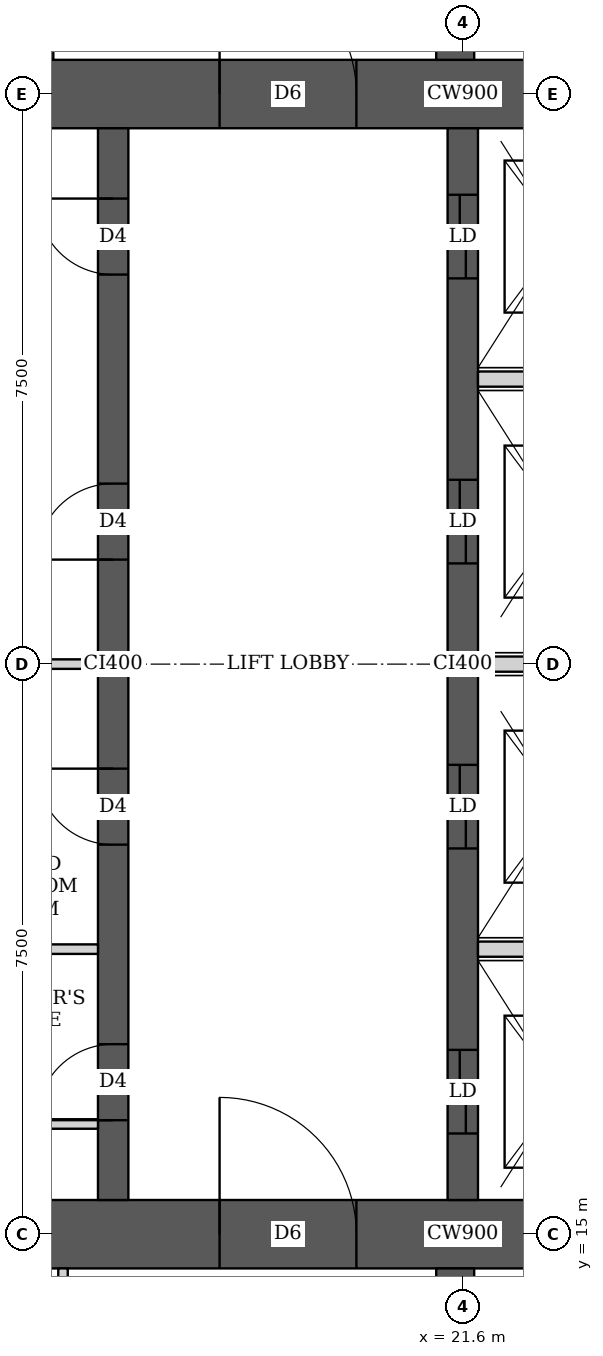
"""IFC4 building model, lengths in metres.
Left out: names, types, materials, properties, quantities, classifications, styles, units other than length and angle.
Written with IfcOpenShell. Run it as: python <this file> out.ifc"""

import sys

from ifc_helpers import new_model, si_unit, direction, frame, frame_2d, origin, place, context, subcontext, project, spatial, rectangle, extrude, element, fill, save


model = new_model("IFC4")
c1 = context("Model", 3, precision=1e-05, world=origin(), true_north=direction((0.0, 1.0)))
c2 = subcontext(c1, "Body", "Model", "MODEL_VIEW")
j1 = project(units=[si_unit("LENGTHUNIT", "METRE"), si_unit("PLANEANGLEUNIT", "RADIAN")], contexts=[c1])
p1 = place(None, origin())
s1 = spatial("IfcSite", under=j1, at=p1, CompositionType="ELEMENT")
p2 = place(p1, origin())
s2 = spatial("IfcBuilding", under=s1, at=p2, CompositionType="ELEMENT")
p3 = place(p2, frame((0.0, 0.0, 255.35)))
s3 = spatial("IfcBuildingStorey", under=s2, at=p3, CompositionType="ELEMENT", Elevation=255.35)
p4 = place(p3, frame((13.95, 15.0, 0.0), z_axis=(0.0, 0.0, 1.0), x_axis=(1.0, 0.0, 0.0)))
e1 = element("IfcWall", 1, at=p4, inside=s3, PredefinedType="SHEAR", context=c2, shape_type="SweptSolid", body=[
    extrude(rectangle(XDim=15.3, YDim=0.9, at=frame_2d((7.65, 0.0))), origin(), (0.0, 0.0, 1.0), 3.75),
])
p5 = place(p4, frame((4.45, 0.0, 0.0)))
e2 = element("IfcOpeningElement", 2, at=p5, cuts=e1, PredefinedType="OPENING", context=c2, shape_type="SweptSolid", body=[
    extrude(rectangle(XDim=1.8, YDim=2.1, at=frame_2d((0.9, 1.05))), frame((0.0, 0.46, 0.0), z_axis=(0.0, -1.0, 0.0), x_axis=(1.0, 0.0, 0.0)), (0.0, 0.0, 1.0), 0.92),
])
p6 = place(p4, frame((10.7, 0.0, 0.0)))
e3 = element("IfcOpeningElement", 3, at=p6, cuts=e1, PredefinedType="OPENING", context=c2, shape_type="SweptSolid", body=[
    extrude(rectangle(XDim=1.1, YDim=2.1, at=frame_2d((0.55, 1.05))), frame((0.0, 0.46, 0.0), z_axis=(0.0, -1.0, 0.0), x_axis=(1.0, 0.0, 0.0)), (0.0, 0.0, 1.0), 0.92),
])
p7 = place(p3, frame((13.95, 30.0, 0.0), z_axis=(0.0, 0.0, 1.0), x_axis=(1.0, 0.0, 0.0)))
e4 = element("IfcWall", 4, at=p7, inside=s3, PredefinedType="SHEAR", context=c2, shape_type="SweptSolid", body=[
    extrude(rectangle(XDim=15.3, YDim=0.9, at=frame_2d((7.65, 0.0))), origin(), (0.0, 0.0, 1.0), 3.75),
])
p8 = place(p7, frame((4.45, 0.0, 0.0)))
e5 = element("IfcOpeningElement", 5, at=p8, cuts=e4, PredefinedType="OPENING", context=c2, shape_type="SweptSolid", body=[
    extrude(rectangle(XDim=1.8, YDim=2.1, at=frame_2d((0.9, 1.05))), frame((0.0, 0.46, 0.0), z_axis=(0.0, -1.0, 0.0), x_axis=(1.0, 0.0, 0.0)), (0.0, 0.0, 1.0), 0.92),
])
p9 = place(p7, frame((10.7, 0.0, 0.0)))
e6 = element("IfcOpeningElement", 6, at=p9, cuts=e4, PredefinedType="OPENING", context=c2, shape_type="SweptSolid", body=[
    extrude(rectangle(XDim=1.1, YDim=2.1, at=frame_2d((0.55, 1.05))), frame((0.0, 0.46, 0.0), z_axis=(0.0, -1.0, 0.0), x_axis=(1.0, 0.0, 0.0)), (0.0, 0.0, 1.0), 0.92),
])
p10 = place(p3, frame((17.0, 15.45, 0.0), z_axis=(0.0, 0.0, 1.0), x_axis=(0.0, 1.0, 0.0)))
e7 = element("IfcWall", 7, at=p10, inside=s3, PredefinedType="SHEAR", context=c2, shape_type="SweptSolid", body=[
    extrude(rectangle(XDim=14.1, YDim=0.4, at=frame_2d((7.05, 0.0))), origin(), (0.0, 0.0, 1.0), 3.75),
])
p11 = place(p10, frame((1.05, 0.0, 0.0)))
e8 = element("IfcOpeningElement", 8, at=p11, cuts=e7, PredefinedType="OPENING", context=c2, shape_type="SweptSolid", body=[
    extrude(rectangle(XDim=1.0, YDim=2.1, at=frame_2d((0.5, 1.05))), frame((0.0, 0.21, 0.0), z_axis=(0.0, -1.0, 0.0), x_axis=(1.0, 0.0, 0.0)), (0.0, 0.0, 1.0), 0.42),
])
p12 = place(p10, frame((4.675, 0.0, 0.0)))
e9 = element("IfcOpeningElement", 9, at=p12, cuts=e7, PredefinedType="OPENING", context=c2, shape_type="SweptSolid", body=[
    extrude(rectangle(XDim=1.0, YDim=2.1, at=frame_2d((0.5, 1.05))), frame((0.0, 0.21, 0.0), z_axis=(0.0, -1.0, 0.0), x_axis=(1.0, 0.0, 0.0)), (0.0, 0.0, 1.0), 0.42),
])
p13 = place(p10, frame((8.425, 0.0, 0.0)))
e10 = element("IfcOpeningElement", 10, at=p13, cuts=e7, PredefinedType="OPENING", context=c2, shape_type="SweptSolid", body=[
    extrude(rectangle(XDim=1.0, YDim=2.1, at=frame_2d((0.5, 1.05))), frame((0.0, 0.21, 0.0), z_axis=(0.0, -1.0, 0.0), x_axis=(1.0, 0.0, 0.0)), (0.0, 0.0, 1.0), 0.42),
])
p14 = place(p10, frame((12.175, 0.0, 0.0)))
e11 = element("IfcOpeningElement", 11, at=p14, cuts=e7, PredefinedType="OPENING", context=c2, shape_type="SweptSolid", body=[
    extrude(rectangle(XDim=1.0, YDim=2.1, at=frame_2d((0.5, 1.05))), frame((0.0, 0.21, 0.0), z_axis=(0.0, -1.0, 0.0), x_axis=(1.0, 0.0, 0.0)), (0.0, 0.0, 1.0), 0.42),
])
p15 = place(p3, frame((21.6, 15.45, 0.0), z_axis=(0.0, 0.0, 1.0), x_axis=(0.0, 1.0, 0.0)))
e12 = element("IfcWall", 12, at=p15, inside=s3, PredefinedType="SHEAR", context=c2, shape_type="SweptSolid", body=[
    extrude(rectangle(XDim=14.1, YDim=0.4, at=frame_2d((7.05, 0.0))), origin(), (0.0, 0.0, 1.0), 3.75),
])
p16 = place(p15, frame((0.875, 0.0, 0.0)))
e13 = element("IfcOpeningElement", 13, at=p16, cuts=e12, PredefinedType="OPENING", context=c2, shape_type="SweptSolid", body=[
    extrude(rectangle(XDim=1.1, YDim=2.1, at=frame_2d((0.55, 1.05))), frame((0.0, 0.21, 0.0), z_axis=(0.0, -1.0, 0.0), x_axis=(1.0, 0.0, 0.0)), (0.0, 0.0, 1.0), 0.42),
])
p17 = place(p15, frame((4.625, 0.0, 0.0)))
e14 = element("IfcOpeningElement", 14, at=p17, cuts=e12, PredefinedType="OPENING", context=c2, shape_type="SweptSolid", body=[
    extrude(rectangle(XDim=1.1, YDim=2.1, at=frame_2d((0.55, 1.05))), frame((0.0, 0.21, 0.0), z_axis=(0.0, -1.0, 0.0), x_axis=(1.0, 0.0, 0.0)), (0.0, 0.0, 1.0), 0.42),
])
p18 = place(p15, frame((8.375, 0.0, 0.0)))
e15 = element("IfcOpeningElement", 15, at=p18, cuts=e12, PredefinedType="OPENING", context=c2, shape_type="SweptSolid", body=[
    extrude(rectangle(XDim=1.1, YDim=2.1, at=frame_2d((0.55, 1.05))), frame((0.0, 0.21, 0.0), z_axis=(0.0, -1.0, 0.0), x_axis=(1.0, 0.0, 0.0)), (0.0, 0.0, 1.0), 0.42),
])
p19 = place(p15, frame((12.125, 0.0, 0.0)))
e16 = element("IfcOpeningElement", 16, at=p19, cuts=e12, PredefinedType="OPENING", context=c2, shape_type="SweptSolid", body=[
    extrude(rectangle(XDim=1.1, YDim=2.1, at=frame_2d((0.55, 1.05))), frame((0.0, 0.21, 0.0), z_axis=(0.0, -1.0, 0.0), x_axis=(1.0, 0.0, 0.0)), (0.0, 0.0, 1.0), 0.42),
])
for number, where, z_axis, x_axis in (
    (17, (21.5, 10.35, 0.0), (0.0, 0.0, 1.0), (0.0, 1.0, 0.0)),
    (18, (21.5, 30.45, 0.0), (0.0, 0.0, 1.0), (0.0, 1.0, 0.0)),
):
    element("IfcWall", number, at=place(p3, frame(where, z_axis=z_axis, x_axis=x_axis)), inside=s3, PredefinedType="SHEAR", context=c2, shape_type="SweptSolid", body=[
        extrude(rectangle(XDim=4.2, YDim=0.5, at=frame_2d((2.1, 0.0))), origin(), (0.0, 0.0, 1.0), 3.75),
    ])
p20 = place(p3, frame((16.34, 10.562, 0.0), z_axis=(0.0, 0.0, 1.0), x_axis=(0.0, 1.0, 0.0)))
e19 = element("IfcWall", 19, at=p20, inside=s3, PredefinedType="PARTITIONING", context=c2, shape_type="SweptSolid", body=[
    extrude(rectangle(XDim=3.988, YDim=0.125, at=frame_2d((1.994, 0.0))), origin(), (0.0, 0.0, 1.0), 3.5),
])
p21 = place(p20, frame((1.438, 0.0, 0.0)))
e20 = element("IfcOpeningElement", 20, at=p21, cuts=e19, PredefinedType="OPENING", context=c2, shape_type="SweptSolid", body=[
    extrude(rectangle(XDim=1.0, YDim=2.1, at=frame_2d((0.5, 1.05))), frame((0.0, 0.073, 0.0), z_axis=(0.0, -1.0, 0.0), x_axis=(1.0, 0.0, 0.0)), (0.0, 0.0, 1.0), 0.145),
])
p22 = place(p3, frame((16.15, 30.45, 0.0), z_axis=(0.0, 0.0, 1.0), x_axis=(0.0, 1.0, 0.0)))
e21 = element("IfcWall", 21, at=p22, inside=s3, PredefinedType="PARTITIONING", context=c2, shape_type="SweptSolid", body=[
    extrude(rectangle(XDim=4.387, YDim=0.125, at=frame_2d((2.193, 0.0))), origin(), (0.0, 0.0, 1.0), 3.5),
])
p23 = place(p22, frame((1.75, 0.0, 0.0)))
e22 = element("IfcOpeningElement", 22, at=p23, cuts=e21, PredefinedType="OPENING", context=c2, shape_type="SweptSolid", body=[
    extrude(rectangle(XDim=1.0, YDim=2.1, at=frame_2d((0.5, 1.05))), frame((0.0, 0.073, 0.0), z_axis=(0.0, -1.0, 0.0), x_axis=(1.0, 0.0, 0.0)), (0.0, 0.0, 1.0), 0.145),
])
p24 = place(p3, frame((14.85, 16.45, 0.0), z_axis=(0.0, 0.0, 1.0), x_axis=(1.0, 0.0, 0.0)))
e23 = element("IfcWall", 23, at=p24, inside=s3, PredefinedType="PARTITIONING", context=c2, shape_type="SweptSolid", body=[
    extrude(rectangle(XDim=1.95, YDim=0.125, at=frame_2d((0.975, 0.0))), origin(), (0.0, 0.0, 1.0), 3.5),
])
p25 = place(p24, frame((0.2, 0.0, 0.0)))
e24 = element("IfcOpeningElement", 24, at=p25, cuts=e23, PredefinedType="OPENING", context=c2, shape_type="SweptSolid", body=[
    extrude(rectangle(XDim=1.0, YDim=2.1, at=frame_2d((0.5, 1.05))), frame((0.0, 0.073, 0.0), z_axis=(0.0, -1.0, 0.0), x_axis=(1.0, 0.0, 0.0)), (0.0, 0.0, 1.0), 0.145),
])
for number, where, z_axis, x_axis in (
    (25, (14.85, 18.75, 0.0), (0.0, 0.0, 1.0), (1.0, 0.0, 0.0)),
    (26, (14.85, 22.5, 0.0), (0.0, 0.0, 1.0), (1.0, 0.0, 0.0)),
):
    element("IfcWall", number, at=place(p3, frame(where, z_axis=z_axis, x_axis=x_axis)), inside=s3, PredefinedType="PARTITIONING", context=c2, shape_type="SweptSolid", body=[
        extrude(rectangle(XDim=1.95, YDim=0.125, at=frame_2d((0.975, 0.0))), origin(), (0.0, 0.0, 1.0), 3.5),
    ])
for number, where, z_axis, x_axis in (
    (27, (21.8, 18.75, 0.0), (0.0, 0.0, 1.0), (1.0, 0.0, 0.0)),
    (28, (21.8, 22.5, 0.0), (0.0, 0.0, 1.0), (1.0, 0.0, 0.0)),
    (29, (21.8, 26.25, 0.0), (0.0, 0.0, 1.0), (1.0, 0.0, 0.0)),
):
    element("IfcWall", number, at=place(p3, frame(where, z_axis=z_axis, x_axis=x_axis)), inside=s3, PredefinedType="SOLIDWALL", context=c2, shape_type="SweptSolid", body=[
        extrude(rectangle(XDim=2.2, YDim=0.2, at=frame_2d((1.1, 0.0))), origin(), (0.0, 0.0, 1.0), 3.5),
    ])
p26 = place(p11, origin())
e30 = element("IfcDoor", 30, at=p26, inside=s3, OperationType="SINGLE_SWING_LEFT", PredefinedType="DOOR", context=c2, shape_type="SweptSolid", body=[
    extrude(rectangle(XDim=1.0, YDim=2.1, at=frame_2d((0.5, 1.05))), frame((0.0, 0.025, 0.0), z_axis=(0.0, -1.0, 0.0), x_axis=(1.0, 0.0, 0.0)), (0.0, 0.0, 1.0), 0.05),
])
fill(e8, e30)
p27 = place(p12, origin())
e31 = element("IfcDoor", 31, at=p27, inside=s3, OperationType="SINGLE_SWING_RIGHT", PredefinedType="DOOR", context=c2, shape_type="SweptSolid", body=[
    extrude(rectangle(XDim=1.0, YDim=2.1, at=frame_2d((0.5, 1.05))), frame((0.0, 0.025, 0.0), z_axis=(0.0, -1.0, 0.0), x_axis=(1.0, 0.0, 0.0)), (0.0, 0.0, 1.0), 0.05),
])
fill(e9, e31)
p28 = place(p13, origin())
e32 = element("IfcDoor", 32, at=p28, inside=s3, OperationType="SINGLE_SWING_LEFT", PredefinedType="DOOR", context=c2, shape_type="SweptSolid", body=[
    extrude(rectangle(XDim=1.0, YDim=2.1, at=frame_2d((0.5, 1.05))), frame((0.0, 0.025, 0.0), z_axis=(0.0, -1.0, 0.0), x_axis=(1.0, 0.0, 0.0)), (0.0, 0.0, 1.0), 0.05),
])
fill(e10, e32)
p29 = place(p14, origin())
e33 = element("IfcDoor", 33, at=p29, inside=s3, OperationType="SINGLE_SWING_RIGHT", PredefinedType="DOOR", context=c2, shape_type="SweptSolid", body=[
    extrude(rectangle(XDim=1.0, YDim=2.1, at=frame_2d((0.5, 1.05))), frame((0.0, 0.025, 0.0), z_axis=(0.0, -1.0, 0.0), x_axis=(1.0, 0.0, 0.0)), (0.0, 0.0, 1.0), 0.05),
])
fill(e11, e33)
p30 = place(p5, origin())
e34 = element("IfcDoor", 34, at=p30, inside=s3, OperationType="DOUBLE_DOOR_SINGLE_SWING", PredefinedType="DOOR", context=c2, shape_type="SweptSolid", body=[
    extrude(rectangle(XDim=1.8, YDim=2.1, at=frame_2d((0.9, 1.05))), frame((0.0, 0.025, 0.0), z_axis=(0.0, -1.0, 0.0), x_axis=(1.0, 0.0, 0.0)), (0.0, 0.0, 1.0), 0.05),
])
fill(e2, e34)
p31 = place(p8, origin())
e35 = element("IfcDoor", 35, at=p31, inside=s3, OperationType="DOUBLE_DOOR_SINGLE_SWING", PredefinedType="DOOR", context=c2, shape_type="SweptSolid", body=[
    extrude(rectangle(XDim=1.8, YDim=2.1, at=frame_2d((0.9, 1.05))), frame((0.0, 0.025, 0.0), z_axis=(0.0, -1.0, 0.0), x_axis=(1.0, 0.0, 0.0)), (0.0, 0.0, 1.0), 0.05),
])
fill(e5, e35)
p32 = place(p16, origin())
e36 = element("IfcDoor", 36, at=p32, inside=s3, OperationType="DOUBLE_DOOR_SLIDING", PredefinedType="DOOR", context=c2, shape_type="SweptSolid", body=[
    extrude(rectangle(XDim=1.1, YDim=2.1, at=frame_2d((0.55, 1.05))), frame((0.0, 0.025, 0.0), z_axis=(0.0, -1.0, 0.0), x_axis=(1.0, 0.0, 0.0)), (0.0, 0.0, 1.0), 0.05),
])
fill(e13, e36)
p33 = place(p17, origin())
e37 = element("IfcDoor", 37, at=p33, inside=s3, OperationType="DOUBLE_DOOR_SLIDING", PredefinedType="DOOR", context=c2, shape_type="SweptSolid", body=[
    extrude(rectangle(XDim=1.1, YDim=2.1, at=frame_2d((0.55, 1.05))), frame((0.0, 0.025, 0.0), z_axis=(0.0, -1.0, 0.0), x_axis=(1.0, 0.0, 0.0)), (0.0, 0.0, 1.0), 0.05),
])
fill(e14, e37)
p34 = place(p18, origin())
e38 = element("IfcDoor", 38, at=p34, inside=s3, OperationType="DOUBLE_DOOR_SLIDING", PredefinedType="DOOR", context=c2, shape_type="SweptSolid", body=[
    extrude(rectangle(XDim=1.1, YDim=2.1, at=frame_2d((0.55, 1.05))), frame((0.0, 0.025, 0.0), z_axis=(0.0, -1.0, 0.0), x_axis=(1.0, 0.0, 0.0)), (0.0, 0.0, 1.0), 0.05),
])
fill(e15, e38)
p35 = place(p19, origin())
e39 = element("IfcDoor", 39, at=p35, inside=s3, OperationType="DOUBLE_DOOR_SLIDING", PredefinedType="DOOR", context=c2, shape_type="SweptSolid", body=[
    extrude(rectangle(XDim=1.1, YDim=2.1, at=frame_2d((0.55, 1.05))), frame((0.0, 0.025, 0.0), z_axis=(0.0, -1.0, 0.0), x_axis=(1.0, 0.0, 0.0)), (0.0, 0.0, 1.0), 0.05),
])
fill(e16, e39)
save(model, sys.argv[1])
